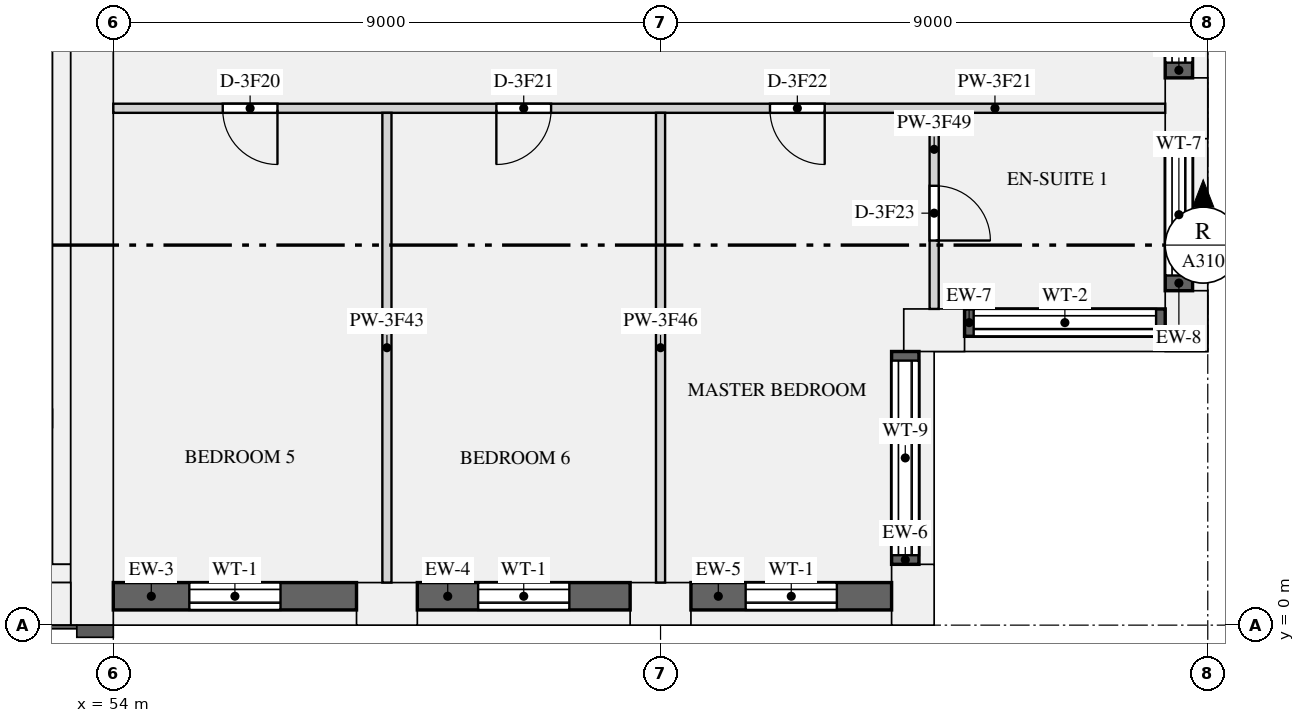
"""IFC4 building model, lengths in metres.
Left out: names, types, materials, properties, quantities, classifications, styles, units other than length and angle.
Written with IfcOpenShell. Run it as: python <this file> out.ifc"""

import sys

from ifc_helpers import new_model, si_unit, direction, frame, frame_2d, origin, origin_2d, place, context, subcontext, project, spatial, rectangle, extrude, element, fill, save


model = new_model("IFC4")
c1 = context("Model", 3, precision=1e-05, world=origin(), true_north=direction((0.0, 1.0)))
c2 = subcontext(c1, "Body", "Model", "MODEL_VIEW")
j1 = project(units=[si_unit("LENGTHUNIT", "METRE"), si_unit("PLANEANGLEUNIT", "RADIAN")], contexts=[c1])
p1 = place(None, origin())
s1 = spatial("IfcSite", under=j1, at=p1, CompositionType="ELEMENT")
p2 = place(p1, origin())
s2 = spatial("IfcBuilding", under=s1, at=p2, CompositionType="ELEMENT")
p3 = place(p2, frame((0.0, 0.0, 182.25)))
s3 = spatial("IfcBuildingStorey", under=s2, at=p3, CompositionType="ELEMENT", Elevation=182.25)
for number, where, z_axis, x_axis in (
    (1, (58.5, 0.35, 0.0), (0.0, 0.0, 1.0), (1.0, 0.0, 0.0)),
    (2, (63.0, 0.35, 0.0), (0.0, 0.0, 1.0), (1.0, 0.0, 0.0)),
    (3, (67.15, 0.5, 0.0), (0.0, 0.0, 1.0), (0.0, 1.0, 0.0)),
    (4, (67.5, 4.85, 0.0), (0.0, 0.0, 1.0), (1.0, 0.0, 0.0)),
    (5, (71.65, 5.0, 0.0), (0.0, 0.0, 1.0), (0.0, 1.0, 0.0)),
    (6, (71.65, 8.5, 0.0), (0.0, 0.0, 1.0), (0.0, 1.0, 0.0)),
):
    element("IfcColumn", number, at=place(p3, frame(where, z_axis=z_axis, x_axis=x_axis)), inside=s3, PredefinedType="USERDEFINED", context=c2, shape_type="SweptSolid", body=[
        extrude(rectangle(XDim=1.0, YDim=0.7, at=origin_2d()), origin(), (0.0, 0.0, 1.0), 3.15),
    ])
p4 = place(p3, frame((53.65, 0.0, 0.0), z_axis=(0.0, 0.0, 1.0), x_axis=(0.0, 1.0, 0.0)))
e7 = element("IfcWall", 7, at=p4, inside=s3, PredefinedType="SHEAR", context=c2, shape_type="SweptSolid", body=[
    extrude(rectangle(XDim=12.5, YDim=0.7, at=frame_2d((6.25, 0.0))), origin(), (0.0, 0.0, 1.0), 3.15),
])
p5 = place(p3, frame((18.7, 0.35, 0.0), z_axis=(0.0, 0.0, 1.0), x_axis=(1.0, 0.0, 0.0)))
e8 = element("IfcWall", 8, at=p5, inside=s3, PredefinedType="SHEAR", context=c2, shape_type="SweptSolid", body=[
    extrude(rectangle(XDim=34.6, YDim=0.7, at=frame_2d((17.3, 0.0))), origin(), (0.0, 0.0, 1.0), 3.15),
])
p6 = place(p3, frame((53.15, 1.0, 0.0), z_axis=(0.0, 0.0, 1.0), x_axis=(0.0, 1.0, 0.0)))
e9 = element("IfcWall", 9, at=p6, inside=s3, PredefinedType="SHEAR", context=c2, shape_type="SweptSolid", body=[
    extrude(rectangle(XDim=10.9, YDim=0.3, at=frame_2d((5.45, 0.0))), origin(), (0.0, 0.0, 1.0), 3.15),
])
p7 = place(p3, frame((18.7, 0.85, 0.0), z_axis=(0.0, 0.0, 1.0), x_axis=(1.0, 0.0, 0.0)))
e10 = element("IfcWall", 10, at=p7, inside=s3, PredefinedType="SHEAR", context=c2, shape_type="SweptSolid", body=[
    extrude(rectangle(XDim=34.6, YDim=0.3, at=frame_2d((17.3, 0.0))), origin(), (0.0, 0.0, 1.0), 3.15),
])
p8 = place(p3, frame((54.0, 0.475, 0.9), z_axis=(0.0, 0.0, 1.0), x_axis=(1.0, 0.0, 0.0)))
e11 = element("IfcWall", 11, at=p8, inside=s3, PredefinedType="SOLIDWALL", context=c2, shape_type="SweptSolid", body=[
    extrude(rectangle(XDim=4.0, YDim=0.45, at=frame_2d((2.0, 0.0))), origin(), (0.0, 0.0, 1.0), 1.75),
])
p9 = place(p8, frame((1.25, 0.0, 0.15)))
e12 = element("IfcOpeningElement", 12, at=p9, cuts=e11, PredefinedType="OPENING", context=c2, shape_type="SweptSolid", body=[
    extrude(rectangle(XDim=1.5, YDim=1.5, at=frame_2d((0.75, 0.75))), frame((0.0, 0.235, 0.0), z_axis=(0.0, -1.0, 0.0), x_axis=(1.0, 0.0, 0.0)), (0.0, 0.0, 1.0), 0.47),
])
p10 = place(p3, frame((59.0, 0.475, 0.9), z_axis=(0.0, 0.0, 1.0), x_axis=(1.0, 0.0, 0.0)))
e13 = element("IfcWall", 13, at=p10, inside=s3, PredefinedType="SOLIDWALL", context=c2, shape_type="SweptSolid", body=[
    extrude(rectangle(XDim=3.5, YDim=0.45, at=frame_2d((1.75, 0.0))), origin(), (0.0, 0.0, 1.0), 1.75),
])
p11 = place(p10, frame((1.0, 0.0, 0.15)))
e14 = element("IfcOpeningElement", 14, at=p11, cuts=e13, PredefinedType="OPENING", context=c2, shape_type="SweptSolid", body=[
    extrude(rectangle(XDim=1.5, YDim=1.5, at=frame_2d((0.75, 0.75))), frame((0.0, 0.235, 0.0), z_axis=(0.0, -1.0, 0.0), x_axis=(1.0, 0.0, 0.0)), (0.0, 0.0, 1.0), 0.47),
])
p12 = place(p3, frame((63.5, 0.475, 0.9), z_axis=(0.0, 0.0, 1.0), x_axis=(1.0, 0.0, 0.0)))
e15 = element("IfcWall", 15, at=p12, inside=s3, PredefinedType="SOLIDWALL", context=c2, shape_type="SweptSolid", body=[
    extrude(rectangle(XDim=3.3, YDim=0.45, at=frame_2d((1.65, 0.0))), origin(), (0.0, 0.0, 1.0), 1.75),
])
p13 = place(p12, frame((0.9, 0.0, 0.15)))
e16 = element("IfcOpeningElement", 16, at=p13, cuts=e15, PredefinedType="OPENING", context=c2, shape_type="SweptSolid", body=[
    extrude(rectangle(XDim=1.5, YDim=1.5, at=frame_2d((0.75, 0.75))), frame((0.0, 0.235, 0.0), z_axis=(0.0, -1.0, 0.0), x_axis=(1.0, 0.0, 0.0)), (0.0, 0.0, 1.0), 0.47),
])
p14 = place(p3, frame((67.025, 1.0, 0.9), z_axis=(0.0, 0.0, 1.0), x_axis=(0.0, 1.0, 0.0)))
e17 = element("IfcWall", 17, at=p14, inside=s3, PredefinedType="SOLIDWALL", context=c2, shape_type="SweptSolid", body=[
    extrude(rectangle(XDim=3.5, YDim=0.45, at=frame_2d((1.75, 0.0))), origin(), (0.0, 0.0, 1.0), 1.75),
])
p15 = place(p14, frame((0.15, 0.0, 0.15)))
e18 = element("IfcOpeningElement", 18, at=p15, cuts=e17, PredefinedType="OPENING", context=c2, shape_type="SweptSolid", body=[
    extrude(rectangle(XDim=3.2, YDim=1.5, at=frame_2d((1.6, 0.75))), frame((0.0, 0.235, 0.0), z_axis=(0.0, -1.0, 0.0), x_axis=(1.0, 0.0, 0.0)), (0.0, 0.0, 1.0), 0.47),
])
p16 = place(p3, frame((68.0, 4.975, 0.9), z_axis=(0.0, 0.0, 1.0), x_axis=(1.0, 0.0, 0.0)))
e19 = element("IfcWall", 19, at=p16, inside=s3, PredefinedType="SOLIDWALL", context=c2, shape_type="SweptSolid", body=[
    extrude(rectangle(XDim=3.3, YDim=0.45, at=frame_2d((1.65, 0.0))), origin(), (0.0, 0.0, 1.0), 1.75),
])
p17 = place(p16, frame((0.15, 0.0, 0.15)))
e20 = element("IfcOpeningElement", 20, at=p17, cuts=e19, PredefinedType="OPENING", context=c2, shape_type="SweptSolid", body=[
    extrude(rectangle(XDim=3.0, YDim=1.5, at=frame_2d((1.5, 0.75))), frame((0.0, 0.235, 0.0), z_axis=(0.0, -1.0, 0.0), x_axis=(1.0, 0.0, 0.0)), (0.0, 0.0, 1.0), 0.47),
])
p18 = place(p3, frame((71.525, 5.5, 0.9), z_axis=(0.0, 0.0, 1.0), x_axis=(0.0, 1.0, 0.0)))
e21 = element("IfcWall", 21, at=p18, inside=s3, PredefinedType="SOLIDWALL", context=c2, shape_type="SweptSolid", body=[
    extrude(rectangle(XDim=2.5, YDim=0.45, at=frame_2d((1.25, 0.0))), origin(), (0.0, 0.0, 1.0), 1.75),
])
p19 = place(p18, frame((0.25, 0.0, 0.15)))
e22 = element("IfcOpeningElement", 22, at=p19, cuts=e21, PredefinedType="OPENING", context=c2, shape_type="SweptSolid", body=[
    extrude(rectangle(XDim=2.0, YDim=1.5, at=frame_2d((1.0, 0.75))), frame((0.0, 0.235, 0.0), z_axis=(0.0, -1.0, 0.0), x_axis=(1.0, 0.0, 0.0)), (0.0, 0.0, 1.0), 0.47),
])
p20 = place(p3, frame((71.525, 9.0, 0.9), z_axis=(0.0, 0.0, 1.0), x_axis=(0.0, 1.0, 0.0)))
e23 = element("IfcWall", 23, at=p20, inside=s3, PredefinedType="SOLIDWALL", context=c2, shape_type="SweptSolid", body=[
    extrude(rectangle(XDim=3.0, YDim=0.45, at=frame_2d((1.5, 0.0))), origin(), (0.0, 0.0, 1.0), 1.75),
])
p21 = place(p20, frame((0.25, 0.0, 0.15)))
e24 = element("IfcOpeningElement", 24, at=p21, cuts=e23, PredefinedType="OPENING", context=c2, shape_type="SweptSolid", body=[
    extrude(rectangle(XDim=2.5, YDim=1.5, at=frame_2d((1.25, 0.75))), frame((0.0, 0.235, 0.0), z_axis=(0.0, -1.0, 0.0), x_axis=(1.0, 0.0, 0.0)), (0.0, 0.0, 1.0), 0.47),
])
p22 = place(p3, frame((54.0, 8.5, 0.0), z_axis=(0.0, 0.0, 1.0), x_axis=(1.0, 0.0, 0.0)))
e25 = element("IfcWall", 25, at=p22, inside=s3, PredefinedType="PARTITIONING", context=c2, shape_type="SweptSolid", body=[
    extrude(rectangle(XDim=17.3, YDim=0.15, at=frame_2d((8.65, 0.0))), origin(), (0.0, 0.0, 1.0), 2.65),
])
p23 = place(p22, frame((1.8, 0.0, 0.0)))
e26 = element("IfcOpeningElement", 26, at=p23, cuts=e25, PredefinedType="OPENING", context=c2, shape_type="SweptSolid", body=[
    extrude(rectangle(XDim=0.9, YDim=2.1, at=frame_2d((0.45, 1.05))), frame((0.0, 0.085, 0.0), z_axis=(0.0, -1.0, 0.0), x_axis=(1.0, 0.0, 0.0)), (0.0, 0.0, 1.0), 0.17),
])
p24 = place(p22, frame((6.3, 0.0, 0.0)))
e27 = element("IfcOpeningElement", 27, at=p24, cuts=e25, PredefinedType="OPENING", context=c2, shape_type="SweptSolid", body=[
    extrude(rectangle(XDim=0.9, YDim=2.1, at=frame_2d((0.45, 1.05))), frame((0.0, 0.085, 0.0), z_axis=(0.0, -1.0, 0.0), x_axis=(1.0, 0.0, 0.0)), (0.0, 0.0, 1.0), 0.17),
])
p25 = place(p22, frame((10.8, 0.0, 0.0)))
e28 = element("IfcOpeningElement", 28, at=p25, cuts=e25, PredefinedType="OPENING", context=c2, shape_type="SweptSolid", body=[
    extrude(rectangle(XDim=0.9, YDim=2.1, at=frame_2d((0.45, 1.05))), frame((0.0, 0.085, 0.0), z_axis=(0.0, -1.0, 0.0), x_axis=(1.0, 0.0, 0.0)), (0.0, 0.0, 1.0), 0.17),
])
for number, where, z_axis, x_axis in (
    (29, (58.5, 0.7, 0.0), (0.0, 0.0, 1.0), (0.0, 1.0, 0.0)),
    (30, (63.0, 0.7, 0.0), (0.0, 0.0, 1.0), (0.0, 1.0, 0.0)),
):
    element("IfcWall", number, at=place(p3, frame(where, z_axis=z_axis, x_axis=x_axis)), inside=s3, PredefinedType="PARTITIONING", context=c2, shape_type="SweptSolid", body=[
        extrude(rectangle(XDim=7.725, YDim=0.15, at=frame_2d((3.863, 0.0))), origin(), (0.0, 0.0, 1.0), 2.65),
    ])
p26 = place(p3, frame((67.5, 5.2, 0.0), z_axis=(0.0, 0.0, 1.0), x_axis=(0.0, 1.0, 0.0)))
e31 = element("IfcWall", 31, at=p26, inside=s3, PredefinedType="PARTITIONING", context=c2, shape_type="SweptSolid", body=[
    extrude(rectangle(XDim=3.225, YDim=0.15, at=frame_2d((1.613, 0.0))), origin(), (0.0, 0.0, 1.0), 2.65),
])
p27 = place(p26, frame((1.125, 0.0, 0.0)))
e32 = element("IfcOpeningElement", 32, at=p27, cuts=e31, PredefinedType="OPENING", context=c2, shape_type="SweptSolid", body=[
    extrude(rectangle(XDim=0.9, YDim=2.1, at=frame_2d((0.45, 1.05))), frame((0.0, 0.085, 0.0), z_axis=(0.0, -1.0, 0.0), x_axis=(1.0, 0.0, 0.0)), (0.0, 0.0, 1.0), 0.17),
])
p28 = place(p9, origin())
e33 = element("IfcWindow", 33, at=p28, inside=s3, PartitioningType="SINGLE_PANEL", PredefinedType="WINDOW", context=c2, shape_type="SweptSolid", body=[
    extrude(rectangle(XDim=1.5, YDim=1.5, at=frame_2d((0.75, 0.75))), frame((0.0, -0.065, 0.0), z_axis=(0.0, -1.0, 0.0), x_axis=(1.0, 0.0, 0.0)), (0.0, 0.0, 1.0), 0.06),
])
fill(e12, e33)
p29 = place(p11, origin())
e34 = element("IfcWindow", 34, at=p29, inside=s3, PartitioningType="SINGLE_PANEL", PredefinedType="WINDOW", context=c2, shape_type="SweptSolid", body=[
    extrude(rectangle(XDim=1.5, YDim=1.5, at=frame_2d((0.75, 0.75))), frame((0.0, -0.065, 0.0), z_axis=(0.0, -1.0, 0.0), x_axis=(1.0, 0.0, 0.0)), (0.0, 0.0, 1.0), 0.06),
])
fill(e14, e34)
p30 = place(p13, origin())
e35 = element("IfcWindow", 35, at=p30, inside=s3, PartitioningType="SINGLE_PANEL", PredefinedType="WINDOW", context=c2, shape_type="SweptSolid", body=[
    extrude(rectangle(XDim=1.5, YDim=1.5, at=frame_2d((0.75, 0.75))), frame((0.0, -0.065, 0.0), z_axis=(0.0, -1.0, 0.0), x_axis=(1.0, 0.0, 0.0)), (0.0, 0.0, 1.0), 0.06),
])
fill(e16, e35)
p31 = place(p15, origin())
e36 = element("IfcWindow", 36, at=p31, inside=s3, PartitioningType="SINGLE_PANEL", PredefinedType="WINDOW", context=c2, shape_type="SweptSolid", body=[
    extrude(rectangle(XDim=3.2, YDim=1.5, at=frame_2d((1.6, 0.75))), frame((0.0, -0.065, 0.0), z_axis=(0.0, -1.0, 0.0), x_axis=(1.0, 0.0, 0.0)), (0.0, 0.0, 1.0), 0.06),
])
fill(e18, e36)
p32 = place(p17, origin())
e37 = element("IfcWindow", 37, at=p32, inside=s3, PartitioningType="SINGLE_PANEL", PredefinedType="WINDOW", context=c2, shape_type="SweptSolid", body=[
    extrude(rectangle(XDim=3.0, YDim=1.5, at=frame_2d((1.5, 0.75))), frame((0.0, -0.065, 0.0), z_axis=(0.0, -1.0, 0.0), x_axis=(1.0, 0.0, 0.0)), (0.0, 0.0, 1.0), 0.06),
])
fill(e20, e37)
p33 = place(p19, origin())
e38 = element("IfcWindow", 38, at=p33, inside=s3, PartitioningType="SINGLE_PANEL", PredefinedType="WINDOW", context=c2, shape_type="SweptSolid", body=[
    extrude(rectangle(XDim=2.0, YDim=1.5, at=frame_2d((1.0, 0.75))), frame((0.0, -0.065, 0.0), z_axis=(0.0, -1.0, 0.0), x_axis=(1.0, 0.0, 0.0)), (0.0, 0.0, 1.0), 0.06),
])
fill(e22, e38)
p34 = place(p21, origin())
e39 = element("IfcWindow", 39, at=p34, inside=s3, PartitioningType="SINGLE_PANEL", PredefinedType="WINDOW", context=c2, shape_type="SweptSolid", body=[
    extrude(rectangle(XDim=2.5, YDim=1.5, at=frame_2d((1.25, 0.75))), frame((0.0, -0.065, 0.0), z_axis=(0.0, -1.0, 0.0), x_axis=(1.0, 0.0, 0.0)), (0.0, 0.0, 1.0), 0.06),
])
fill(e24, e39)
p35 = place(p23, frame((0.9, 0.0, 0.0), z_axis=(0.0, 0.0, 1.0), x_axis=(-1.0, 0.0, 0.0)))
e40 = element("IfcDoor", 40, at=p35, inside=s3, OperationType="SINGLE_SWING_LEFT", PredefinedType="DOOR", context=c2, shape_type="SweptSolid", body=[
    extrude(rectangle(XDim=0.9, YDim=2.1, at=frame_2d((0.45, 1.05))), frame((0.0, 0.025, 0.0), z_axis=(0.0, -1.0, 0.0), x_axis=(1.0, 0.0, 0.0)), (0.0, 0.0, 1.0), 0.05),
])
fill(e26, e40)
p36 = place(p24, frame((0.9, 0.0, 0.0), z_axis=(0.0, 0.0, 1.0), x_axis=(-1.0, 0.0, 0.0)))
e41 = element("IfcDoor", 41, at=p36, inside=s3, OperationType="SINGLE_SWING_RIGHT", PredefinedType="DOOR", context=c2, shape_type="SweptSolid", body=[
    extrude(rectangle(XDim=0.9, YDim=2.1, at=frame_2d((0.45, 1.05))), frame((0.0, 0.025, 0.0), z_axis=(0.0, -1.0, 0.0), x_axis=(1.0, 0.0, 0.0)), (0.0, 0.0, 1.0), 0.05),
])
fill(e27, e41)
p37 = place(p25, frame((0.9, 0.0, 0.0), z_axis=(0.0, 0.0, 1.0), x_axis=(-1.0, 0.0, 0.0)))
e42 = element("IfcDoor", 42, at=p37, inside=s3, OperationType="SINGLE_SWING_LEFT", PredefinedType="DOOR", context=c2, shape_type="SweptSolid", body=[
    extrude(rectangle(XDim=0.9, YDim=2.1, at=frame_2d((0.45, 1.05))), frame((0.0, 0.025, 0.0), z_axis=(0.0, -1.0, 0.0), x_axis=(1.0, 0.0, 0.0)), (0.0, 0.0, 1.0), 0.05),
])
fill(e28, e42)
p38 = place(p27, frame((0.9, 0.0, 0.0), z_axis=(0.0, 0.0, 1.0), x_axis=(-1.0, 0.0, 0.0)))
e43 = element("IfcDoor", 43, at=p38, inside=s3, OperationType="SINGLE_SWING_RIGHT", PredefinedType="DOOR", context=c2, shape_type="SweptSolid", body=[
    extrude(rectangle(XDim=0.9, YDim=2.1, at=frame_2d((0.45, 1.05))), frame((0.0, 0.025, 0.0), z_axis=(0.0, -1.0, 0.0), x_axis=(1.0, 0.0, 0.0)), (0.0, 0.0, 1.0), 0.05),
])
fill(e32, e43)
save(model, sys.argv[1])
